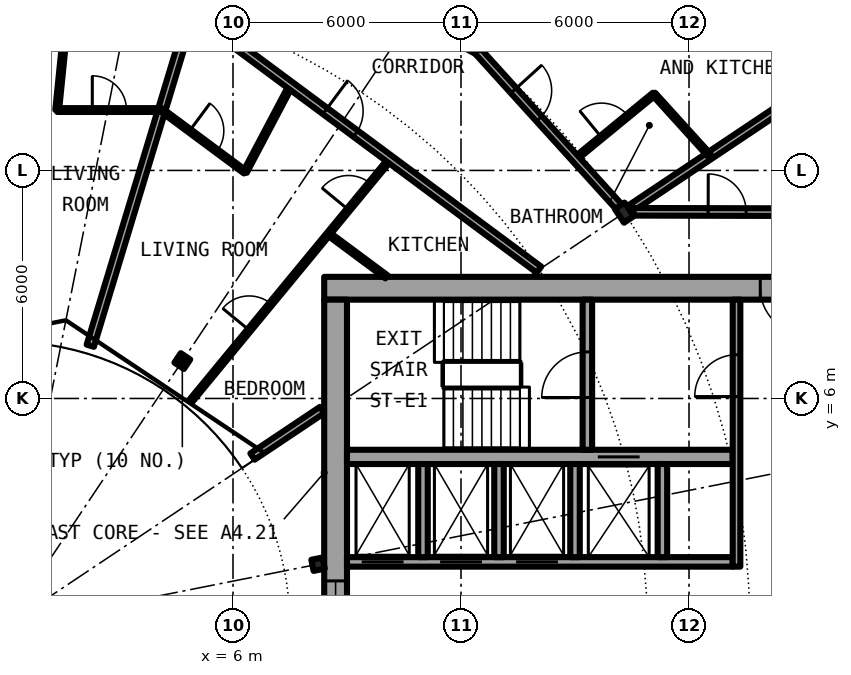
"""IFC4 building model, lengths in metres.
Left out: names, types, materials, properties, quantities, classifications, styles, units other than length and angle.
Written with IfcOpenShell. Run it as: python <this file> out.ifc"""

import sys

from ifc_helpers import new_model, si_unit, direction, frame, frame_2d, origin, origin_2d, place, context, subcontext, project, spatial, rectangle, i_section, extrude, element, fill, save


model = new_model("IFC4")
c1 = context("Model", 3, precision=1e-05, world=origin(), true_north=direction((0.0, 1.0)))
c2 = subcontext(c1, "Body", "Model", "MODEL_VIEW")
j1 = project(units=[si_unit("LENGTHUNIT", "METRE"), si_unit("PLANEANGLEUNIT", "RADIAN")], contexts=[c1])
p1 = place(None, origin())
s1 = spatial("IfcSite", under=j1, at=p1, CompositionType="ELEMENT")
p2 = place(p1, origin())
s2 = spatial("IfcBuilding", under=s1, at=p2, CompositionType="ELEMENT")
p3 = place(p2, frame((0.0, 0.0, 120.8)))
s3 = spatial("IfcBuildingStorey", under=s2, at=p3, CompositionType="ELEMENT", Elevation=120.8)
p4 = place(p3, frame((16.297, 10.889, 0.0), z_axis=(0.0, 0.0, 1.0), x_axis=(0.831469612303, 0.55557023302, 0.0)))
e1 = element("IfcColumn", 1, at=p4, inside=s3, PredefinedType="COLUMN", context=c2, shape_type="SweptSolid", body=[
    extrude(i_section(OverallWidth=0.307, OverallDepth=0.432, WebThickness=0.021, FlangeThickness=0.04, FilletRadius=0.027, at=origin_2d()), origin(), (0.0, 0.0, 1.0), 3.05),
])
for number, where, z_axis, x_axis in (
    (2, (8.239, 1.639, 0.0), (0.0, 0.0, 1.0), (0.981, 0.195, 0.0)),
    (3, (4.667, 6.984, 0.0), (0.0, 0.0, 1.0), (0.556, 0.831, 0.0)),
):
    element("IfcColumn", number, at=place(p3, frame(where, z_axis=z_axis, x_axis=x_axis)), inside=s3, PredefinedType="COLUMN", context=c2, shape_type="SweptSolid", body=[
        extrude(i_section(OverallWidth=0.3, OverallDepth=0.3, WebThickness=0.011, FlangeThickness=0.019, FilletRadius=0.027, at=origin_2d()), origin(), (0.0, 0.0, 1.0), 3.05),
    ])
p5 = place(p3, frame((22.699, 15.167, 0.0), z_axis=(0.0, 0.0, 1.0), x_axis=(-0.634382322723, 0.773019449054, 0.0)))
e4 = element("IfcWall", 4, at=p5, inside=s3, PredefinedType="SOLIDWALL", context=c2, shape_type="SweptSolid", body=[
    extrude(rectangle(XDim=5.352, YDim=0.25, at=frame_2d((2.676, 0.0))), origin(), (0.0, 0.0, 1.0), 2.7),
])
p6 = place(p5, frame((0.841, 0.0, 0.0)))
e5 = element("IfcOpeningElement", 5, at=p6, cuts=e4, PredefinedType="OPENING", context=c2, shape_type="SweptSolid", body=[
    extrude(rectangle(XDim=1.0, YDim=2.2, at=frame_2d((0.5, 1.1))), frame((0.0, 0.135, 0.0), z_axis=(0.0, -1.0, 0.0), x_axis=(1.0, 0.0, 0.0)), (0.0, 0.0, 1.0), 0.27),
])
p7 = place(p5, frame((3.111, 0.0, 0.3)))
e6 = element("IfcOpeningElement", 6, at=p7, cuts=e4, PredefinedType="OPENING", context=c2, shape_type="SweptSolid", body=[
    extrude(rectangle(XDim=1.8, YDim=2.1, at=frame_2d((0.9, 1.05))), frame((0.0, 0.135, 0.0), z_axis=(0.0, -1.0, 0.0), x_axis=(1.0, 0.0, 0.0)), (0.0, 0.0, 1.0), 0.27),
])
p8 = place(p3, frame((22.2, 8.9, 0.0), z_axis=(0.0, 0.0, 1.0), x_axis=(-1.0, 0.0, 0.0)))
e7 = element("IfcWall", 7, at=p8, inside=s3, PredefinedType="SHEAR", context=c2, shape_type="SweptSolid", body=[
    extrude(rectangle(XDim=13.8, YDim=0.6, at=frame_2d((6.9, 0.0))), origin(), (0.0, 0.0, 1.0), 3.05),
])
p9 = place(p8, frame((1.125, 0.0, 0.0)))
e8 = element("IfcOpeningElement", 8, at=p9, cuts=e7, PredefinedType="OPENING", context=c2, shape_type="SweptSolid", body=[
    extrude(rectangle(XDim=1.2, YDim=2.3, at=frame_2d((0.6, 1.15))), frame((0.0, 0.31, 0.0), z_axis=(0.0, -1.0, 0.0), x_axis=(1.0, 0.0, 0.0)), (0.0, 0.0, 1.0), 0.62),
])
p10 = place(p3, frame((8.7, -8.6, 0.0), z_axis=(0.0, 0.0, 1.0), x_axis=(0.0, 1.0, 0.0)))
e9 = element("IfcWall", 9, at=p10, inside=s3, PredefinedType="SHEAR", context=c2, shape_type="SweptSolid", body=[
    extrude(rectangle(XDim=17.2, YDim=0.6, at=frame_2d((8.6, 0.0))), origin(), (0.0, 0.0, 1.0), 3.05),
])
p11 = place(p10, frame((7.4, 0.0, 0.1)))
e10 = element("IfcOpeningElement", 10, at=p11, cuts=e9, PredefinedType="OPENING", context=c2, shape_type="SweptSolid", body=[
    extrude(rectangle(XDim=2.4, YDim=2.2, at=frame_2d((1.2, 1.1))), frame((0.0, 0.31, 0.0), z_axis=(0.0, -1.0, 0.0), x_axis=(1.0, 0.0, 0.0)), (0.0, 0.0, 1.0), 0.62),
])
p12 = place(p3, frame((9.0, 1.7, 0.0), z_axis=(0.0, 0.0, 1.0), x_axis=(1.0, 0.0, 0.0)))
e11 = element("IfcWall", 11, at=p12, inside=s3, PredefinedType="SHEAR", context=c2, shape_type="SweptSolid", body=[
    extrude(rectangle(XDim=10.15, YDim=0.25, at=frame_2d((5.075, 0.0))), origin(), (0.0, 0.0, 1.0), 3.05),
])
p13 = place(p12, frame((0.387, 0.0, 0.0)))
e12 = element("IfcOpeningElement", 12, at=p13, cuts=e11, PredefinedType="OPENING", context=c2, shape_type="SweptSolid", body=[
    extrude(rectangle(XDim=1.1, YDim=2.3, at=frame_2d((0.55, 1.15))), frame((0.0, 0.135, 0.0), z_axis=(0.0, -1.0, 0.0), x_axis=(1.0, 0.0, 0.0)), (0.0, 0.0, 1.0), 0.27),
])
p14 = place(p12, frame((2.45, 0.0, 0.0)))
e13 = element("IfcOpeningElement", 13, at=p14, cuts=e11, PredefinedType="OPENING", context=c2, shape_type="SweptSolid", body=[
    extrude(rectangle(XDim=1.1, YDim=2.3, at=frame_2d((0.55, 1.15))), frame((0.0, 0.135, 0.0), z_axis=(0.0, -1.0, 0.0), x_axis=(1.0, 0.0, 0.0)), (0.0, 0.0, 1.0), 0.27),
])
p15 = place(p12, frame((4.45, 0.0, 0.0)))
e14 = element("IfcOpeningElement", 14, at=p15, cuts=e11, PredefinedType="OPENING", context=c2, shape_type="SweptSolid", body=[
    extrude(rectangle(XDim=1.1, YDim=2.3, at=frame_2d((0.55, 1.15))), frame((0.0, 0.135, 0.0), z_axis=(0.0, -1.0, 0.0), x_axis=(1.0, 0.0, 0.0)), (0.0, 0.0, 1.0), 0.27),
])
p16 = place(p3, frame((9.0, 4.462, 0.0), z_axis=(0.0, 0.0, 1.0), x_axis=(1.0, 0.0, 0.0)))
e15 = element("IfcWall", 15, at=p16, inside=s3, PredefinedType="SHEAR", context=c2, shape_type="SweptSolid", body=[
    extrude(rectangle(XDim=10.15, YDim=0.375, at=frame_2d((5.075, 0.0))), origin(), (0.0, 0.0, 1.0), 3.05),
])
p17 = place(p16, frame((6.6, 0.0, 0.0)))
e16 = element("IfcOpeningElement", 16, at=p17, cuts=e15, PredefinedType="OPENING", context=c2, shape_type="SweptSolid", body=[
    extrude(rectangle(XDim=1.1, YDim=2.3, at=frame_2d((0.55, 1.15))), frame((0.0, 0.198, 0.0), z_axis=(0.0, -1.0, 0.0), x_axis=(1.0, 0.0, 0.0)), (0.0, 0.0, 1.0), 0.395),
])
p18 = place(p3, frame((15.325, 4.65, 0.0), z_axis=(0.0, 0.0, 1.0), x_axis=(0.0, 1.0, 0.0)))
e17 = element("IfcWall", 17, at=p18, inside=s3, PredefinedType="SHEAR", context=c2, shape_type="SweptSolid", body=[
    extrude(rectangle(XDim=3.95, YDim=0.25, at=frame_2d((1.975, 0.0))), origin(), (0.0, 0.0, 1.0), 3.05),
])
p19 = place(p18, frame((1.375, 0.0, 0.0)))
e18 = element("IfcOpeningElement", 18, at=p19, cuts=e17, PredefinedType="OPENING", context=c2, shape_type="SweptSolid", body=[
    extrude(rectangle(XDim=1.2, YDim=2.3, at=frame_2d((0.6, 1.15))), frame((0.0, 0.135, 0.0), z_axis=(0.0, -1.0, 0.0), x_axis=(1.0, 0.0, 0.0)), (0.0, 0.0, 1.0), 0.27),
])
for number, where, z_axis, x_axis in (
    (19, (15.0, 1.825, 0.0), (0.0, 0.0, 1.0), (0.0, 1.0, 0.0)),
    (20, (17.3, 1.825, 0.0), (0.0, 0.0, 1.0), (0.0, 1.0, 0.0)),
):
    element("IfcWall", number, at=place(p3, frame(where, z_axis=z_axis, x_axis=x_axis)), inside=s3, PredefinedType="SOLIDWALL", context=c2, shape_type="SweptSolid", body=[
        extrude(rectangle(XDim=2.45, YDim=0.25, at=frame_2d((1.225, 0.0))), origin(), (0.0, 0.0, 1.0), 2.7),
    ])
p20 = place(p3, frame((19.25, 1.575, 0.0), z_axis=(0.0, 0.0, 1.0), x_axis=(0.0, 1.0, 0.0)))
e21 = element("IfcWall", 21, at=p20, inside=s3, PredefinedType="SOLIDWALL", context=c2, shape_type="SweptSolid", body=[
    extrude(rectangle(XDim=7.025, YDim=0.2, at=frame_2d((3.513, 0.0))), origin(), (0.0, 0.0, 1.0), 2.7),
])
p21 = place(p20, frame((4.475, 0.0, 0.0)))
e22 = element("IfcOpeningElement", 22, at=p21, cuts=e21, PredefinedType="OPENING", context=c2, shape_type="SweptSolid", body=[
    extrude(rectangle(XDim=1.1, YDim=2.3, at=frame_2d((0.55, 1.15))), frame((0.0, 0.11, 0.0), z_axis=(0.0, -1.0, 0.0), x_axis=(1.0, 0.0, 0.0)), (0.0, 0.0, 1.0), 0.22),
])
for number, where, z_axis, x_axis in (
    (23, (11.0, 1.825, 0.0), (0.0, 0.0, 1.0), (0.0, 1.0, 0.0)),
    (24, (13.0, 1.825, 0.0), (0.0, 0.0, 1.0), (0.0, 1.0, 0.0)),
):
    element("IfcWall", number, at=place(p3, frame(where, z_axis=z_axis, x_axis=x_axis)), inside=s3, PredefinedType="SOLIDWALL", context=c2, shape_type="SweptSolid", body=[
        extrude(rectangle(XDim=2.45, YDim=0.25, at=frame_2d((1.225, 0.0))), origin(), (0.0, 0.0, 1.0), 2.7),
    ])
p22 = place(p3, frame((2.245, 7.387, 0.0), z_axis=(0.0, 0.0, 1.0), x_axis=(0.289977130626, 0.957033575019, 0.0)))
e25 = element("IfcWall", 25, at=p22, inside=s3, PredefinedType="PARTITIONING", context=c2, shape_type="SweptSolid", body=[
    extrude(rectangle(XDim=9.18, YDim=0.2, at=frame_2d((4.59, 0.0))), origin(), (0.0, 0.0, 1.0), 2.7),
])
p23 = place(p3, frame((1.374, 13.589, 0.0), z_axis=(0.0, 0.0, 1.0), x_axis=(0.100527855112, 0.994934244233, 0.0)))
e26 = element("IfcWall", 26, at=p23, inside=s3, PredefinedType="PARTITIONING", context=c2, shape_type="SweptSolid", body=[
    extrude(rectangle(XDim=2.596, YDim=0.1, at=frame_2d((1.298, 0.0))), origin(), (0.0, 0.0, 1.0), 2.7),
])
p24 = place(p3, frame((4.909, 5.958, 0.0), z_axis=(0.0, 0.0, 1.0), x_axis=(0.635976043025, 0.771708800454, 0.0)))
e27 = element("IfcWall", 27, at=p24, inside=s3, PredefinedType="PARTITIONING", context=c2, shape_type="SweptSolid", body=[
    extrude(rectangle(XDim=8.213, YDim=0.1, at=frame_2d((4.106, 0.0))), origin(), (0.0, 0.0, 1.0), 2.7),
])
p25 = place(p24, frame((6.49, 0.0, 0.0)))
e28 = element("IfcOpeningElement", 28, at=p25, cuts=e27, PredefinedType="OPENING", context=c2, shape_type="SweptSolid", body=[
    extrude(rectangle(XDim=0.9, YDim=2.3, at=frame_2d((0.45, 1.15))), frame((0.0, 0.06, 0.0), z_axis=(0.0, -1.0, 0.0), x_axis=(1.0, 0.0, 0.0)), (0.0, 0.0, 1.0), 0.12),
])
p26 = place(p24, frame((2.384, 0.0, 0.0)))
e29 = element("IfcOpeningElement", 29, at=p26, cuts=e27, PredefinedType="OPENING", context=c2, shape_type="SweptSolid", body=[
    extrude(rectangle(XDim=0.9, YDim=2.3, at=frame_2d((0.45, 1.15))), frame((0.0, 0.06, 0.0), z_axis=(0.0, -1.0, 0.0), x_axis=(1.0, 0.0, 0.0)), (0.0, 0.0, 1.0), 0.12),
])
p27 = place(p3, frame((6.318, 11.96, 0.0), z_axis=(0.0, 0.0, 1.0), x_axis=(0.467001992543, 0.884256263173, 0.0)))
e30 = element("IfcWall", 30, at=p27, inside=s3, PredefinedType="PARTITIONING", context=c2, shape_type="SweptSolid", body=[
    extrude(rectangle(XDim=2.572, YDim=0.1, at=frame_2d((1.286, 0.0))), origin(), (0.0, 0.0, 1.0), 2.7),
])
p28 = place(p3, frame((12.436, 15.149, 0.0), z_axis=(0.0, 0.0, 1.0), x_axis=(0.63447412651, 0.772944100689, 0.0)))
e31 = element("IfcWall", 31, at=p28, inside=s3, PredefinedType="PARTITIONING", context=c2, shape_type="SweptSolid", body=[
    extrude(rectangle(XDim=7.576, YDim=0.2, at=frame_2d((3.788, 0.0))), origin(), (0.0, 0.0, 1.0), 2.7),
])
p29 = place(p3, frame((15.01, 12.309, 0.0), z_axis=(0.0, 0.0, 1.0), x_axis=(0.773240932873, 0.634112339992, 0.0)))
e32 = element("IfcWall", 32, at=p29, inside=s3, PredefinedType="PARTITIONING", context=c2, shape_type="SweptSolid", body=[
    extrude(rectangle(XDim=2.674, YDim=0.1, at=frame_2d((1.337, 0.0))), origin(), (0.0, 0.0, 1.0), 2.7),
])
p30 = place(p29, frame((0.887, 0.0, 0.0)))
e33 = element("IfcOpeningElement", 33, at=p30, cuts=e32, PredefinedType="OPENING", context=c2, shape_type="SweptSolid", body=[
    extrude(rectangle(XDim=0.9, YDim=2.3, at=frame_2d((0.45, 1.15))), frame((0.0, 0.06, 0.0), z_axis=(0.0, -1.0, 0.0), x_axis=(1.0, 0.0, 0.0)), (0.0, 0.0, 1.0), 0.12),
])
p31 = place(p3, frame((16.477, 11.009, 0.0), z_axis=(0.0, 0.0, 1.0), x_axis=(0.831406593008, 0.555664536482, 0.0)))
e34 = element("IfcWall", 34, at=p31, inside=s3, PredefinedType="PARTITIONING", context=c2, shape_type="SweptSolid", body=[
    extrude(rectangle(XDim=7.358, YDim=0.2, at=frame_2d((3.679, 0.0))), origin(), (0.0, 0.0, 1.0), 2.7),
])
p32 = place(p3, frame((6.513, 4.472, 0.0), z_axis=(0.0, 0.0, 1.0), x_axis=(0.831333375071, 0.555774072347, 0.0)))
e35 = element("IfcWall", 35, at=p32, inside=s3, PredefinedType="PARTITIONING", context=c2, shape_type="SweptSolid", body=[
    extrude(rectangle(XDim=2.203, YDim=0.2, at=frame_2d((1.101, 0.0))), origin(), (0.0, 0.0, 1.0), 2.7),
])
p33 = place(p3, frame((16.541, 10.912, 0.0), z_axis=(0.0, 0.0, 1.0), x_axis=(0.999997173357, -0.002377662213, 0.0)))
e36 = element("IfcWall", 36, at=p33, inside=s3, PredefinedType="PARTITIONING", context=c2, shape_type="SweptSolid", body=[
    extrude(rectangle(XDim=5.134, YDim=0.2, at=frame_2d((2.567, 0.0))), origin(), (0.0, 0.0, 1.0), 2.7),
])
p34 = place(p33, frame((1.963, 0.0, 0.0)))
e37 = element("IfcOpeningElement", 37, at=p34, cuts=e36, PredefinedType="OPENING", context=c2, shape_type="SweptSolid", body=[
    extrude(rectangle(XDim=1.0, YDim=2.3, at=frame_2d((0.5, 1.15))), frame((0.0, 0.11, 0.0), z_axis=(0.0, -1.0, 0.0), x_axis=(1.0, 0.0, 0.0)), (0.0, 0.0, 1.0), 0.22),
])
p35 = place(p3, frame((4.122, 13.589, 0.0), z_axis=(0.0, 0.0, 1.0), x_axis=(0.803128348509, -0.595806055542, 0.0)))
e38 = element("IfcWall", 38, at=p35, inside=s3, PredefinedType="PARTITIONING", context=c2, shape_type="SweptSolid", body=[
    extrude(rectangle(XDim=2.734, YDim=0.1, at=frame_2d((1.367, 0.0))), origin(), (0.0, 0.0, 1.0), 2.7),
])
p36 = place(p35, frame((0.917, 0.0, 0.0)))
e39 = element("IfcOpeningElement", 39, at=p36, cuts=e38, PredefinedType="OPENING", context=c2, shape_type="SweptSolid", body=[
    extrude(rectangle(XDim=0.9, YDim=2.3, at=frame_2d((0.45, 1.15))), frame((0.0, 0.06, 0.0), z_axis=(0.0, -1.0, 0.0), x_axis=(1.0, 0.0, 0.0)), (0.0, 0.0, 1.0), 0.12),
])
p37 = place(p3, frame((8.513, 10.332, 0.0), z_axis=(0.0, 0.0, 1.0), x_axis=(0.803149591038, -0.595777420196, 0.0)))
e40 = element("IfcWall", 40, at=p37, inside=s3, PredefinedType="PARTITIONING", context=c2, shape_type="SweptSolid", body=[
    extrude(rectangle(XDim=1.9, YDim=0.1, at=frame_2d((0.95, 0.0))), origin(), (0.0, 0.0, 1.0), 2.7),
])
p38 = place(p3, frame((1.374, 13.589, 0.0), z_axis=(0.0, 0.0, 1.0), x_axis=(1.0, 0.0, 0.0)))
e41 = element("IfcWall", 41, at=p38, inside=s3, PredefinedType="PARTITIONING", context=c2, shape_type="SweptSolid", body=[
    extrude(rectangle(XDim=2.748, YDim=0.1, at=frame_2d((1.374, 0.0))), origin(), (0.0, 0.0, 1.0), 2.7),
])
p39 = place(p38, frame((0.924, 0.0, 0.0)))
e42 = element("IfcOpeningElement", 42, at=p39, cuts=e41, PredefinedType="OPENING", context=c2, shape_type="SweptSolid", body=[
    extrude(rectangle(XDim=0.9, YDim=2.3, at=frame_2d((0.45, 1.15))), frame((0.0, 0.06, 0.0), z_axis=(0.0, -1.0, 0.0), x_axis=(1.0, 0.0, 0.0)), (0.0, 0.0, 1.0), 0.12),
])
p40 = place(p3, frame((4.906, 16.172, 0.0), z_axis=(0.0, 0.0, 1.0), x_axis=(0.803204584823, -0.59570327758, 0.0)))
e43 = element("IfcWall", 43, at=p40, inside=s3, PredefinedType="PARTITIONING", context=c2, shape_type="SweptSolid", body=[
    extrude(rectangle(XDim=11.387, YDim=0.2, at=frame_2d((5.693, 0.0))), origin(), (0.0, 0.0, 1.0), 2.7),
])
p41 = place(p40, frame((4.38, 0.0, 0.0)))
e44 = element("IfcOpeningElement", 44, at=p41, cuts=e43, PredefinedType="OPENING", context=c2, shape_type="SweptSolid", body=[
    extrude(rectangle(XDim=1.0, YDim=2.3, at=frame_2d((0.5, 1.15))), frame((0.0, 0.11, 0.0), z_axis=(0.0, -1.0, 0.0), x_axis=(1.0, 0.0, 0.0)), (0.0, 0.0, 1.0), 0.22),
])
p42 = place(p3, frame((5.687, 18.757, 0.0), z_axis=(0.0, 0.0, 1.0), x_axis=(0.8819312112, -0.471378127104, 0.0)))
e45 = element("IfcWall", 45, at=p42, inside=s3, PredefinedType="PARTITIONING", context=c2, shape_type="SweptSolid", body=[
    extrude(rectangle(XDim=7.65, YDim=0.2, at=frame_2d((3.825, 0.0))), origin(), (0.0, 0.0, 1.0), 2.39),
])
p43 = place(p42, frame((2.371, 0.0, 0.0)))
e46 = element("IfcOpeningElement", 46, at=p43, cuts=e45, PredefinedType="OPENING", context=c2, shape_type="SweptSolid", body=[
    extrude(rectangle(XDim=1.0, YDim=2.3, at=frame_2d((0.5, 1.15))), frame((0.0, 0.11, 0.0), z_axis=(0.0, -1.0, 0.0), x_axis=(1.0, 0.0, 0.0)), (0.0, 0.0, 1.0), 0.22),
])
p44 = place(p3, frame((12.434, 15.151, 0.0), z_axis=(0.0, 0.0, 1.0), x_axis=(0.671481997275, -0.741020868354, 0.0)))
e47 = element("IfcWall", 47, at=p44, inside=s3, PredefinedType="PARTITIONING", context=c2, shape_type="SweptSolid", body=[
    extrude(rectangle(XDim=5.596, YDim=0.2, at=frame_2d((2.798, 0.0))), origin(), (0.0, 0.0, 1.0), 2.39),
])
p45 = place(p44, frame((1.417, 0.0, 0.0)))
e48 = element("IfcOpeningElement", 48, at=p45, cuts=e47, PredefinedType="OPENING", context=c2, shape_type="SweptSolid", body=[
    extrude(rectangle(XDim=1.0, YDim=2.3, at=frame_2d((0.5, 1.15))), frame((0.0, 0.11, 0.0), z_axis=(0.0, -1.0, 0.0), x_axis=(1.0, 0.0, 0.0)), (0.0, 0.0, 1.0), 0.22),
])
p46 = place(p3, frame((17.072, 14.011, 0.0), z_axis=(0.0, 0.0, 1.0), x_axis=(0.67169789574, -0.740825172937, 0.0)))
e49 = element("IfcWall", 49, at=p46, inside=s3, PredefinedType="PARTITIONING", context=c2, shape_type="SweptSolid", body=[
    extrude(rectangle(XDim=2.183, YDim=0.1, at=frame_2d((1.091, 0.0))), origin(), (0.0, 0.0, 1.0), 2.7),
])
p47 = place(p13, origin())
e50 = element("IfcDoor", 50, at=p47, inside=s3, OperationType="DOUBLE_DOOR_SLIDING", PredefinedType="DOOR", context=c2, shape_type="SweptSolid", body=[
    extrude(rectangle(XDim=1.1, YDim=2.3, at=frame_2d((0.55, 1.15))), frame((0.0, 0.025, 0.0), z_axis=(0.0, -1.0, 0.0), x_axis=(1.0, 0.0, 0.0)), (0.0, 0.0, 1.0), 0.05),
])
fill(e12, e50)
p48 = place(p14, origin())
e51 = element("IfcDoor", 51, at=p48, inside=s3, OperationType="DOUBLE_DOOR_SLIDING", PredefinedType="DOOR", context=c2, shape_type="SweptSolid", body=[
    extrude(rectangle(XDim=1.1, YDim=2.3, at=frame_2d((0.55, 1.15))), frame((0.0, 0.025, 0.0), z_axis=(0.0, -1.0, 0.0), x_axis=(1.0, 0.0, 0.0)), (0.0, 0.0, 1.0), 0.05),
])
fill(e13, e51)
p49 = place(p15, origin())
e52 = element("IfcDoor", 52, at=p49, inside=s3, OperationType="DOUBLE_DOOR_SLIDING", PredefinedType="DOOR", context=c2, shape_type="SweptSolid", body=[
    extrude(rectangle(XDim=1.1, YDim=2.3, at=frame_2d((0.55, 1.15))), frame((0.0, 0.025, 0.0), z_axis=(0.0, -1.0, 0.0), x_axis=(1.0, 0.0, 0.0)), (0.0, 0.0, 1.0), 0.05),
])
fill(e14, e52)
p50 = place(p17, origin())
e53 = element("IfcDoor", 53, at=p50, inside=s3, OperationType="DOUBLE_DOOR_SLIDING", PredefinedType="DOOR", context=c2, shape_type="SweptSolid", body=[
    extrude(rectangle(XDim=1.1, YDim=2.3, at=frame_2d((0.55, 1.15))), frame((0.0, 0.025, 0.0), z_axis=(0.0, -1.0, 0.0), x_axis=(1.0, 0.0, 0.0)), (0.0, 0.0, 1.0), 0.05),
])
fill(e16, e53)
p51 = place(p19, origin())
e54 = element("IfcDoor", 54, at=p51, inside=s3, OperationType="SINGLE_SWING_LEFT", PredefinedType="DOOR", context=c2, shape_type="SweptSolid", body=[
    extrude(rectangle(XDim=1.2, YDim=2.3, at=frame_2d((0.6, 1.15))), frame((0.0, 0.025, 0.0), z_axis=(0.0, -1.0, 0.0), x_axis=(1.0, 0.0, 0.0)), (0.0, 0.0, 1.0), 0.05),
])
fill(e18, e54)
p52 = place(p21, origin())
e55 = element("IfcDoor", 55, at=p52, inside=s3, OperationType="SINGLE_SWING_LEFT", PredefinedType="DOOR", context=c2, shape_type="SweptSolid", body=[
    extrude(rectangle(XDim=1.1, YDim=2.3, at=frame_2d((0.55, 1.15))), frame((0.0, 0.025, 0.0), z_axis=(0.0, -1.0, 0.0), x_axis=(1.0, 0.0, 0.0)), (0.0, 0.0, 1.0), 0.05),
])
fill(e22, e55)
p53 = place(p9, origin())
e56 = element("IfcDoor", 56, at=p53, inside=s3, OperationType="SINGLE_SWING_RIGHT", PredefinedType="DOOR", context=c2, shape_type="SweptSolid", body=[
    extrude(rectangle(XDim=1.2, YDim=2.3, at=frame_2d((0.6, 1.15))), frame((0.0, 0.025, 0.0), z_axis=(0.0, -1.0, 0.0), x_axis=(1.0, 0.0, 0.0)), (0.0, 0.0, 1.0), 0.05),
])
fill(e8, e56)
p54 = place(p11, origin())
e57 = element("IfcWindow", 57, at=p54, inside=s3, PartitioningType="SINGLE_PANEL", PredefinedType="WINDOW", context=c2, shape_type="SweptSolid", body=[
    extrude(rectangle(XDim=2.4, YDim=2.2, at=frame_2d((1.2, 1.1))), frame((0.0, 0.03, 0.0), z_axis=(0.0, -1.0, 0.0), x_axis=(1.0, 0.0, 0.0)), (0.0, 0.0, 1.0), 0.06),
])
fill(e10, e57)
p55 = place(p45, origin())
e58 = element("IfcDoor", 58, at=p55, inside=s3, OperationType="SINGLE_SWING_LEFT", PredefinedType="DOOR", context=c2, shape_type="SweptSolid", body=[
    extrude(rectangle(XDim=1.0, YDim=2.3, at=frame_2d((0.5, 1.15))), frame((0.0, 0.025, 0.0), z_axis=(0.0, -1.0, 0.0), x_axis=(1.0, 0.0, 0.0)), (0.0, 0.0, 1.0), 0.05),
])
fill(e48, e58)
p56 = place(p30, origin())
e59 = element("IfcDoor", 59, at=p56, inside=s3, OperationType="SINGLE_SWING_LEFT", PredefinedType="DOOR", context=c2, shape_type="SweptSolid", body=[
    extrude(rectangle(XDim=0.9, YDim=2.3, at=frame_2d((0.45, 1.15))), frame((0.0, 0.025, 0.0), z_axis=(0.0, -1.0, 0.0), x_axis=(1.0, 0.0, 0.0)), (0.0, 0.0, 1.0), 0.05),
])
fill(e33, e59)
p57 = place(p41, origin())
e60 = element("IfcDoor", 60, at=p57, inside=s3, OperationType="SINGLE_SWING_LEFT", PredefinedType="DOOR", context=c2, shape_type="SweptSolid", body=[
    extrude(rectangle(XDim=1.0, YDim=2.3, at=frame_2d((0.5, 1.15))), frame((0.0, 0.025, 0.0), z_axis=(0.0, -1.0, 0.0), x_axis=(1.0, 0.0, 0.0)), (0.0, 0.0, 1.0), 0.05),
])
fill(e44, e60)
p58 = place(p36, origin())
e61 = element("IfcDoor", 61, at=p58, inside=s3, OperationType="SINGLE_SWING_LEFT", PredefinedType="DOOR", context=c2, shape_type="SweptSolid", body=[
    extrude(rectangle(XDim=0.9, YDim=2.3, at=frame_2d((0.45, 1.15))), frame((0.0, 0.025, 0.0), z_axis=(0.0, -1.0, 0.0), x_axis=(1.0, 0.0, 0.0)), (0.0, 0.0, 1.0), 0.05),
])
fill(e39, e61)
p59 = place(p25, origin())
e62 = element("IfcDoor", 62, at=p59, inside=s3, OperationType="SINGLE_SWING_RIGHT", PredefinedType="DOOR", context=c2, shape_type="SweptSolid", body=[
    extrude(rectangle(XDim=0.9, YDim=2.3, at=frame_2d((0.45, 1.15))), frame((0.0, 0.025, 0.0), z_axis=(0.0, -1.0, 0.0), x_axis=(1.0, 0.0, 0.0)), (0.0, 0.0, 1.0), 0.05),
])
fill(e28, e62)
p60 = place(p26, origin())
e63 = element("IfcDoor", 63, at=p60, inside=s3, OperationType="SINGLE_SWING_LEFT", PredefinedType="DOOR", context=c2, shape_type="SweptSolid", body=[
    extrude(rectangle(XDim=0.9, YDim=2.3, at=frame_2d((0.45, 1.15))), frame((0.0, 0.025, 0.0), z_axis=(0.0, -1.0, 0.0), x_axis=(1.0, 0.0, 0.0)), (0.0, 0.0, 1.0), 0.05),
])
fill(e29, e63)
p61 = place(p39, origin())
e64 = element("IfcDoor", 64, at=p61, inside=s3, OperationType="SINGLE_SWING_RIGHT", PredefinedType="DOOR", context=c2, shape_type="SweptSolid", body=[
    extrude(rectangle(XDim=0.9, YDim=2.3, at=frame_2d((0.45, 1.15))), frame((0.0, 0.025, 0.0), z_axis=(0.0, -1.0, 0.0), x_axis=(1.0, 0.0, 0.0)), (0.0, 0.0, 1.0), 0.05),
])
fill(e42, e64)
p62 = place(p34, origin())
e65 = element("IfcDoor", 65, at=p62, inside=s3, OperationType="SINGLE_SWING_LEFT", PredefinedType="DOOR", context=c2, shape_type="SweptSolid", body=[
    extrude(rectangle(XDim=1.0, YDim=2.3, at=frame_2d((0.5, 1.15))), frame((0.0, 0.025, 0.0), z_axis=(0.0, -1.0, 0.0), x_axis=(1.0, 0.0, 0.0)), (0.0, 0.0, 1.0), 0.05),
])
fill(e37, e65)
save(model, sys.argv[1])
